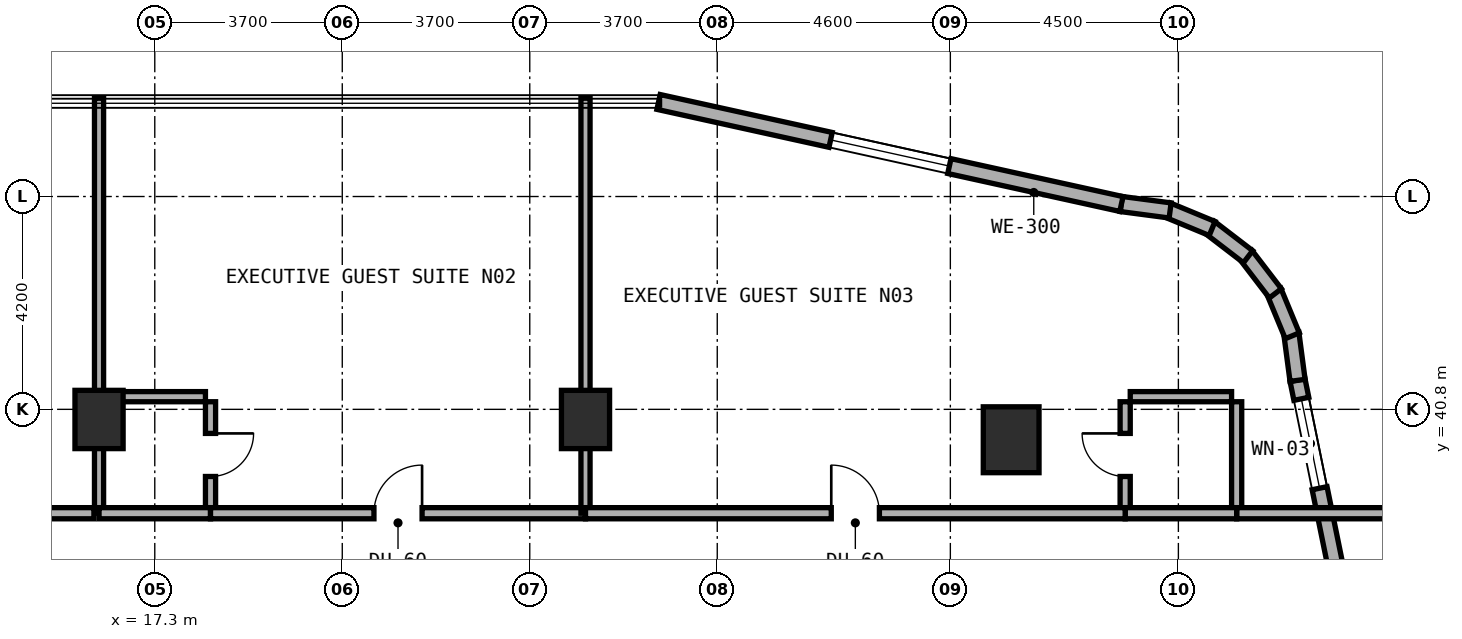
"""IFC4 building model, lengths in metres.
Left out: names, types, materials, properties, quantities, classifications, styles, units other than length and angle.
Written with IfcOpenShell. Run it as: python <this file> out.ifc"""

import sys

from ifc_helpers import new_model, si_unit, direction, frame, frame_2d, origin, origin_2d, place, context, subcontext, project, spatial, rectangle, extrude, element, fill, save


model = new_model("IFC4")
c1 = context("Model", 3, precision=1e-05, world=origin(), true_north=direction((0.0, 1.0)))
c2 = subcontext(c1, "Body", "Model", "MODEL_VIEW")
j1 = project(units=[si_unit("LENGTHUNIT", "METRE"), si_unit("PLANEANGLEUNIT", "RADIAN")], contexts=[c1])
p1 = place(None, origin())
s1 = spatial("IfcSite", under=j1, at=p1, CompositionType="ELEMENT")
p2 = place(p1, origin())
s2 = spatial("IfcBuilding", under=s1, at=p2, CompositionType="ELEMENT")
p3 = place(p2, frame((0.0, 0.0, 38.0)))
s3 = spatial("IfcBuildingStorey", under=s2, at=p3, CompositionType="ELEMENT", Elevation=38.0)
for number, where, z_axis, x_axis in (
    (1, (16.2, 40.6, 0.0), (0.0, 0.0, 1.0), (1.0, 0.0, 0.0)),
    (2, (25.8, 40.6, 0.0), (0.0, 0.0, 1.0), (1.0, 0.0, 0.0)),
):
    element("IfcColumn", number, at=place(p3, frame(where, z_axis=z_axis, x_axis=x_axis)), inside=s3, PredefinedType="COLUMN", context=c2, shape_type="SweptSolid", body=[
        extrude(rectangle(XDim=0.95, YDim=1.15, at=origin_2d()), origin(), (0.0, 0.0, 1.0), 3.5),
    ])
p4 = place(p3, frame((34.2, 40.2, 0.0), z_axis=(0.0, 0.0, 1.0), x_axis=(1.0, 0.0, 0.0)))
e3 = element("IfcColumn", 3, at=p4, inside=s3, PredefinedType="COLUMN", context=c2, shape_type="SweptSolid", body=[
    extrude(rectangle(XDim=1.1, YDim=1.3, at=origin_2d()), origin(), (0.0, 0.0, 1.0), 3.5),
])
p5 = place(p3, frame((41.864, 31.516, 0.0), z_axis=(0.0, 0.0, 1.0), x_axis=(-0.199990901713, 0.979797754249, 0.0)))
e4 = element("IfcWall", 4, at=p5, inside=s3, PredefinedType="STANDARD", context=c2, shape_type="SweptSolid", body=[
    extrude(rectangle(XDim=10.065, YDim=0.3, at=frame_2d((5.033, 0.0))), origin(), (0.0, 0.0, 1.0), 3.22),
])
p6 = place(p5, frame((2.429, 0.0, 0.8)))
e5 = element("IfcOpeningElement", 5, at=p6, cuts=e4, PredefinedType="OPENING", context=c2, shape_type="SweptSolid", body=[
    extrude(rectangle(XDim=2.4, YDim=1.6, at=frame_2d((1.2, 0.8))), frame((0.0, 0.16, 0.0), z_axis=(0.0, -1.0, 0.0), x_axis=(1.0, 0.0, 0.0)), (0.0, 0.0, 1.0), 0.32),
])
p7 = place(p5, frame((7.887, 0.0, 0.85)))
e6 = element("IfcOpeningElement", 6, at=p7, cuts=e4, PredefinedType="OPENING", context=c2, shape_type="SweptSolid", body=[
    extrude(rectangle(XDim=1.8, YDim=1.5, at=frame_2d((0.9, 0.75))), frame((0.0, 0.16, 0.0), z_axis=(0.0, -1.0, 0.0), x_axis=(1.0, 0.0, 0.0)), (0.0, 0.0, 1.0), 0.32),
])
p8 = place(p3, frame((39.852, 41.372, 0.0), z_axis=(0.0, 0.0, 1.0), x_axis=(-0.131174864804, 0.991359246108, 0.0)))
e7 = element("IfcWall", 7, at=p8, inside=s3, PredefinedType="STANDARD", context=c2, shape_type="SweptSolid", body=[
    extrude(rectangle(XDim=0.938, YDim=0.3, at=frame_2d((0.469, 0.0))), origin(), (0.0, 0.0, 1.0), 3.22),
])
p9 = place(p3, frame((39.748, 42.252, 0.0), z_axis=(0.0, 0.0, 1.0), x_axis=(-0.382344263057, 0.924019948111, 0.0)))
e8 = element("IfcWall", 8, at=p9, inside=s3, PredefinedType="STANDARD", context=c2, shape_type="SweptSolid", body=[
    extrude(rectangle(XDim=0.955, YDim=0.3, at=frame_2d((0.477, 0.0))), origin(), (0.0, 0.0, 1.0), 3.22),
])
p10 = place(p3, frame((39.414, 43.089, 0.0), z_axis=(0.0, 0.0, 1.0), x_axis=(-0.608474481025, 0.793573440799, 0.0)))
e9 = element("IfcWall", 9, at=p10, inside=s3, PredefinedType="STANDARD", context=c2, shape_type="SweptSolid", body=[
    extrude(rectangle(XDim=0.955, YDim=0.3, at=frame_2d((0.478, 0.0))), origin(), (0.0, 0.0, 1.0), 3.22),
])
p11 = place(p3, frame((38.875, 43.812, 0.0), z_axis=(0.0, 0.0, 1.0), x_axis=(-0.793668068435, 0.608351047625, 0.0)))
e10 = element("IfcWall", 10, at=p11, inside=s3, PredefinedType="STANDARD", context=c2, shape_type="SweptSolid", body=[
    extrude(rectangle(XDim=0.955, YDim=0.3, at=frame_2d((0.478, 0.0))), origin(), (0.0, 0.0, 1.0), 3.22),
])
p12 = place(p3, frame((38.166, 44.369, 0.0), z_axis=(0.0, 0.0, 1.0), x_axis=(-0.924019948111, 0.382344263057, 0.0)))
e11 = element("IfcWall", 11, at=p12, inside=s3, PredefinedType="STANDARD", context=c2, shape_type="SweptSolid", body=[
    extrude(rectangle(XDim=0.955, YDim=0.3, at=frame_2d((0.477, 0.0))), origin(), (0.0, 0.0, 1.0), 3.22),
])
p13 = place(p3, frame((37.337, 44.725, 0.0), z_axis=(0.0, 0.0, 1.0), x_axis=(-0.991454295543, 0.130454512571, 0.0)))
e12 = element("IfcWall", 12, at=p13, inside=s3, PredefinedType="STANDARD", context=c2, shape_type="SweptSolid", body=[
    extrude(rectangle(XDim=0.973, YDim=0.3, at=frame_2d((0.487, 0.0))), origin(), (0.0, 0.0, 1.0), 3.22),
])
p14 = place(p3, frame((36.376, 44.852, 0.0), z_axis=(0.0, 0.0, 1.0), x_axis=(-0.97654500432, 0.215313386808, 0.0)))
e13 = element("IfcWall", 13, at=p14, inside=s3, PredefinedType="STANDARD", context=c2, shape_type="SweptSolid", body=[
    extrude(rectangle(XDim=9.354, YDim=0.3, at=frame_2d((4.677, 0.0))), origin(), (0.0, 0.0, 1.0), 3.22),
])
p15 = place(p14, frame((3.477, 0.0, 0.8)))
e14 = element("IfcOpeningElement", 14, at=p15, cuts=e13, PredefinedType="OPENING", context=c2, shape_type="SweptSolid", body=[
    extrude(rectangle(XDim=2.4, YDim=1.6, at=frame_2d((1.2, 0.8))), frame((0.0, 0.16, 0.0), z_axis=(0.0, -1.0, 0.0), x_axis=(1.0, 0.0, 0.0)), (0.0, 0.0, 1.0), 0.32),
])
p16 = place(p3, frame((7.9, 38.75, 0.0), z_axis=(0.0, 0.0, 1.0), x_axis=(1.0, 0.0, 0.0)))
e15 = element("IfcWall", 15, at=p16, inside=s3, PredefinedType="SOLIDWALL", context=c2, shape_type="SweptSolid", body=[
    extrude(rectangle(XDim=8.2, YDim=0.22, at=frame_2d((4.1, 0.0))), origin(), (0.0, 0.0, 1.0), 2.865),
])
p17 = place(p16, frame((3.252, 0.0, 0.0)))
e16 = element("IfcOpeningElement", 16, at=p17, cuts=e15, PredefinedType="OPENING", context=c2, shape_type="SweptSolid", body=[
    extrude(rectangle(XDim=0.95, YDim=2.1, at=frame_2d((0.475, 1.05))), frame((0.0, 0.12, 0.0), z_axis=(0.0, -1.0, 0.0), x_axis=(1.0, 0.0, 0.0)), (0.0, 0.0, 1.0), 0.24),
])
p18 = place(p3, frame((16.2, 38.75, 0.0), z_axis=(0.0, 0.0, 1.0), x_axis=(0.0, 1.0, 0.0)))
e17 = element("IfcWall", 17, at=p18, inside=s3, PredefinedType="SOLIDWALL", context=c2, shape_type="SweptSolid", body=[
    extrude(rectangle(XDim=8.19, YDim=0.18, at=frame_2d((4.095, 0.0))), origin(), (0.0, 0.0, 1.0), 2.395),
])
p19 = place(p3, frame((18.4, 38.85, 0.0), z_axis=(0.0, 0.0, 1.0), x_axis=(0.0, 1.0, 0.0)))
e18 = element("IfcWall", 18, at=p19, inside=s3, PredefinedType="PLUMBINGWALL", context=c2, shape_type="SweptSolid", body=[
    extrude(rectangle(XDim=2.1, YDim=0.2, at=frame_2d((1.05, 0.0))), origin(), (0.0, 0.0, 1.0), 2.745),
])
p20 = place(p19, frame((0.625, 0.0, 0.0)))
e19 = element("IfcOpeningElement", 19, at=p20, cuts=e18, PredefinedType="OPENING", context=c2, shape_type="SweptSolid", body=[
    extrude(rectangle(XDim=0.85, YDim=2.1, at=frame_2d((0.425, 1.05))), frame((0.0, 0.11, 0.0), z_axis=(0.0, -1.0, 0.0), x_axis=(1.0, 0.0, 0.0)), (0.0, 0.0, 1.0), 0.22),
])
p21 = place(p3, frame((16.3, 41.05, 0.0), z_axis=(0.0, 0.0, 1.0), x_axis=(1.0, 0.0, 0.0)))
e20 = element("IfcWall", 20, at=p21, inside=s3, PredefinedType="PLUMBINGWALL", context=c2, shape_type="SweptSolid", body=[
    extrude(rectangle(XDim=2.0, YDim=0.2, at=frame_2d((1.0, 0.0))), origin(), (0.0, 0.0, 1.0), 3.22),
])
p22 = place(p3, frame((16.2, 38.75, 0.0), z_axis=(0.0, 0.0, 1.0), x_axis=(1.0, 0.0, 0.0)))
e21 = element("IfcWall", 21, at=p22, inside=s3, PredefinedType="SOLIDWALL", context=c2, shape_type="SweptSolid", body=[
    extrude(rectangle(XDim=2.2, YDim=0.22, at=frame_2d((1.1, 0.0))), origin(), (0.0, 0.0, 1.0), 2.395),
])
p23 = place(p3, frame((18.4, 38.75, 0.0), z_axis=(0.0, 0.0, 1.0), x_axis=(1.0, 0.0, 0.0)))
e22 = element("IfcWall", 22, at=p23, inside=s3, PredefinedType="SOLIDWALL", context=c2, shape_type="SweptSolid", body=[
    extrude(rectangle(XDim=7.4, YDim=0.22, at=frame_2d((3.7, 0.0))), origin(), (0.0, 0.0, 1.0), 2.395),
])
p24 = place(p23, frame((3.225, 0.0, 0.0)))
e23 = element("IfcOpeningElement", 23, at=p24, cuts=e22, PredefinedType="OPENING", context=c2, shape_type="SweptSolid", body=[
    extrude(rectangle(XDim=0.95, YDim=2.1, at=frame_2d((0.475, 1.05))), frame((0.0, 0.12, 0.0), z_axis=(0.0, -1.0, 0.0), x_axis=(1.0, 0.0, 0.0)), (0.0, 0.0, 1.0), 0.24),
])
p25 = place(p3, frame((25.8, 38.75, 0.0), z_axis=(0.0, 0.0, 1.0), x_axis=(0.0, 1.0, 0.0)))
e24 = element("IfcWall", 24, at=p25, inside=s3, PredefinedType="SOLIDWALL", context=c2, shape_type="SweptSolid", body=[
    extrude(rectangle(XDim=8.19, YDim=0.18, at=frame_2d((4.095, 0.0))), origin(), (0.0, 0.0, 1.0), 2.395),
])
p26 = place(p3, frame((36.45, 38.85, 0.0), z_axis=(0.0, 0.0, 1.0), x_axis=(0.0, 1.0, 0.0)))
e25 = element("IfcWall", 25, at=p26, inside=s3, PredefinedType="PLUMBINGWALL", context=c2, shape_type="SweptSolid", body=[
    extrude(rectangle(XDim=2.1, YDim=0.2, at=frame_2d((1.05, 0.0))), origin(), (0.0, 0.0, 1.0), 3.22),
])
p27 = place(p26, frame((0.625, 0.0, 0.0)))
e26 = element("IfcOpeningElement", 26, at=p27, cuts=e25, PredefinedType="OPENING", context=c2, shape_type="SweptSolid", body=[
    extrude(rectangle(XDim=0.85, YDim=2.1, at=frame_2d((0.425, 1.05))), frame((0.0, 0.11, 0.0), z_axis=(0.0, -1.0, 0.0), x_axis=(1.0, 0.0, 0.0)), (0.0, 0.0, 1.0), 0.22),
])
p28 = place(p3, frame((36.55, 41.05, 0.0), z_axis=(0.0, 0.0, 1.0), x_axis=(1.0, 0.0, 0.0)))
e27 = element("IfcWall", 27, at=p28, inside=s3, PredefinedType="PLUMBINGWALL", context=c2, shape_type="SweptSolid", body=[
    extrude(rectangle(XDim=2.0, YDim=0.2, at=frame_2d((1.0, 0.0))), origin(), (0.0, 0.0, 1.0), 3.22),
])
p29 = place(p3, frame((38.65, 38.85, 0.0), z_axis=(0.0, 0.0, 1.0), x_axis=(0.0, 1.0, 0.0)))
e28 = element("IfcWall", 28, at=p29, inside=s3, PredefinedType="PLUMBINGWALL", context=c2, shape_type="SweptSolid", body=[
    extrude(rectangle(XDim=2.1, YDim=0.2, at=frame_2d((1.05, 0.0))), origin(), (0.0, 0.0, 1.0), 3.22),
])
p30 = place(p3, frame((38.65, 38.75, 0.0), z_axis=(0.0, 0.0, 1.0), x_axis=(1.0, 0.0, 0.0)))
e29 = element("IfcWall", 29, at=p30, inside=s3, PredefinedType="SOLIDWALL", context=c2, shape_type="SweptSolid", body=[
    extrude(rectangle(XDim=3.19, YDim=0.22, at=frame_2d((1.595, 0.0))), origin(), (0.0, 0.0, 1.0), 3.22),
])
p31 = place(p3, frame((36.45, 38.75, 0.0), z_axis=(0.0, 0.0, 1.0), x_axis=(1.0, 0.0, 0.0)))
e30 = element("IfcWall", 30, at=p31, inside=s3, PredefinedType="SOLIDWALL", context=c2, shape_type="SweptSolid", body=[
    extrude(rectangle(XDim=2.2, YDim=0.22, at=frame_2d((1.1, 0.0))), origin(), (0.0, 0.0, 1.0), 3.22),
])
p32 = place(p3, frame((25.8, 38.75, 0.0), z_axis=(0.0, 0.0, 1.0), x_axis=(1.0, 0.0, 0.0)))
e31 = element("IfcWall", 31, at=p32, inside=s3, PredefinedType="SOLIDWALL", context=c2, shape_type="SweptSolid", body=[
    extrude(rectangle(XDim=10.65, YDim=0.22, at=frame_2d((5.325, 0.0))), origin(), (0.0, 0.0, 1.0), 2.395),
])
p33 = place(p32, frame((4.85, 0.0, 0.0)))
e32 = element("IfcOpeningElement", 32, at=p33, cuts=e31, PredefinedType="OPENING", context=c2, shape_type="SweptSolid", body=[
    extrude(rectangle(XDim=0.95, YDim=2.1, at=frame_2d((0.475, 1.05))), frame((0.0, 0.12, 0.0), z_axis=(0.0, -1.0, 0.0), x_axis=(1.0, 0.0, 0.0)), (0.0, 0.0, 1.0), 0.24),
])
p34 = place(p7, origin())
e33 = element("IfcWindow", 33, at=p34, inside=s3, PartitioningType="SINGLE_PANEL", PredefinedType="WINDOW", context=c2, shape_type="SweptSolid", body=[
    extrude(rectangle(XDim=1.8, YDim=1.5, at=frame_2d((0.9, 0.75))), frame((0.0, 0.03, 0.0), z_axis=(0.0, -1.0, 0.0), x_axis=(1.0, 0.0, 0.0)), (0.0, 0.0, 1.0), 0.06),
])
fill(e6, e33)
p35 = place(p15, origin())
e34 = element("IfcWindow", 34, at=p35, inside=s3, PartitioningType="SINGLE_PANEL", PredefinedType="WINDOW", context=c2, shape_type="SweptSolid", body=[
    extrude(rectangle(XDim=2.4, YDim=1.6, at=frame_2d((1.2, 0.8))), frame((0.0, 0.03, 0.0), z_axis=(0.0, -1.0, 0.0), x_axis=(1.0, 0.0, 0.0)), (0.0, 0.0, 1.0), 0.06),
])
fill(e14, e34)
p36 = place(p20, frame((0.85, 0.0, 0.0), z_axis=(0.0, 0.0, 1.0), x_axis=(-1.0, 0.0, 0.0)))
e35 = element("IfcDoor", 35, at=p36, inside=s3, OperationType="SINGLE_SWING_LEFT", PredefinedType="DOOR", context=c2, shape_type="SweptSolid", body=[
    extrude(rectangle(XDim=0.85, YDim=2.1, at=frame_2d((0.425, 1.05))), frame((0.0, 0.025, 0.0), z_axis=(0.0, -1.0, 0.0), x_axis=(1.0, 0.0, 0.0)), (0.0, 0.0, 1.0), 0.05),
])
fill(e19, e35)
p37 = place(p24, origin())
e36 = element("IfcDoor", 36, at=p37, inside=s3, OperationType="SINGLE_SWING_RIGHT", PredefinedType="DOOR", context=c2, shape_type="SweptSolid", body=[
    extrude(rectangle(XDim=0.95, YDim=2.1, at=frame_2d((0.475, 1.05))), frame((0.0, 0.025, 0.0), z_axis=(0.0, -1.0, 0.0), x_axis=(1.0, 0.0, 0.0)), (0.0, 0.0, 1.0), 0.05),
])
fill(e23, e36)
p38 = place(p27, origin())
e37 = element("IfcDoor", 37, at=p38, inside=s3, OperationType="SINGLE_SWING_RIGHT", PredefinedType="DOOR", context=c2, shape_type="SweptSolid", body=[
    extrude(rectangle(XDim=0.85, YDim=2.1, at=frame_2d((0.425, 1.05))), frame((0.0, 0.025, 0.0), z_axis=(0.0, -1.0, 0.0), x_axis=(1.0, 0.0, 0.0)), (0.0, 0.0, 1.0), 0.05),
])
fill(e26, e37)
p39 = place(p33, origin())
e38 = element("IfcDoor", 38, at=p39, inside=s3, OperationType="SINGLE_SWING_LEFT", PredefinedType="DOOR", context=c2, shape_type="SweptSolid", body=[
    extrude(rectangle(XDim=0.95, YDim=2.1, at=frame_2d((0.475, 1.05))), frame((0.0, 0.025, 0.0), z_axis=(0.0, -1.0, 0.0), x_axis=(1.0, 0.0, 0.0)), (0.0, 0.0, 1.0), 0.05),
])
fill(e32, e38)
save(model, sys.argv[1])
